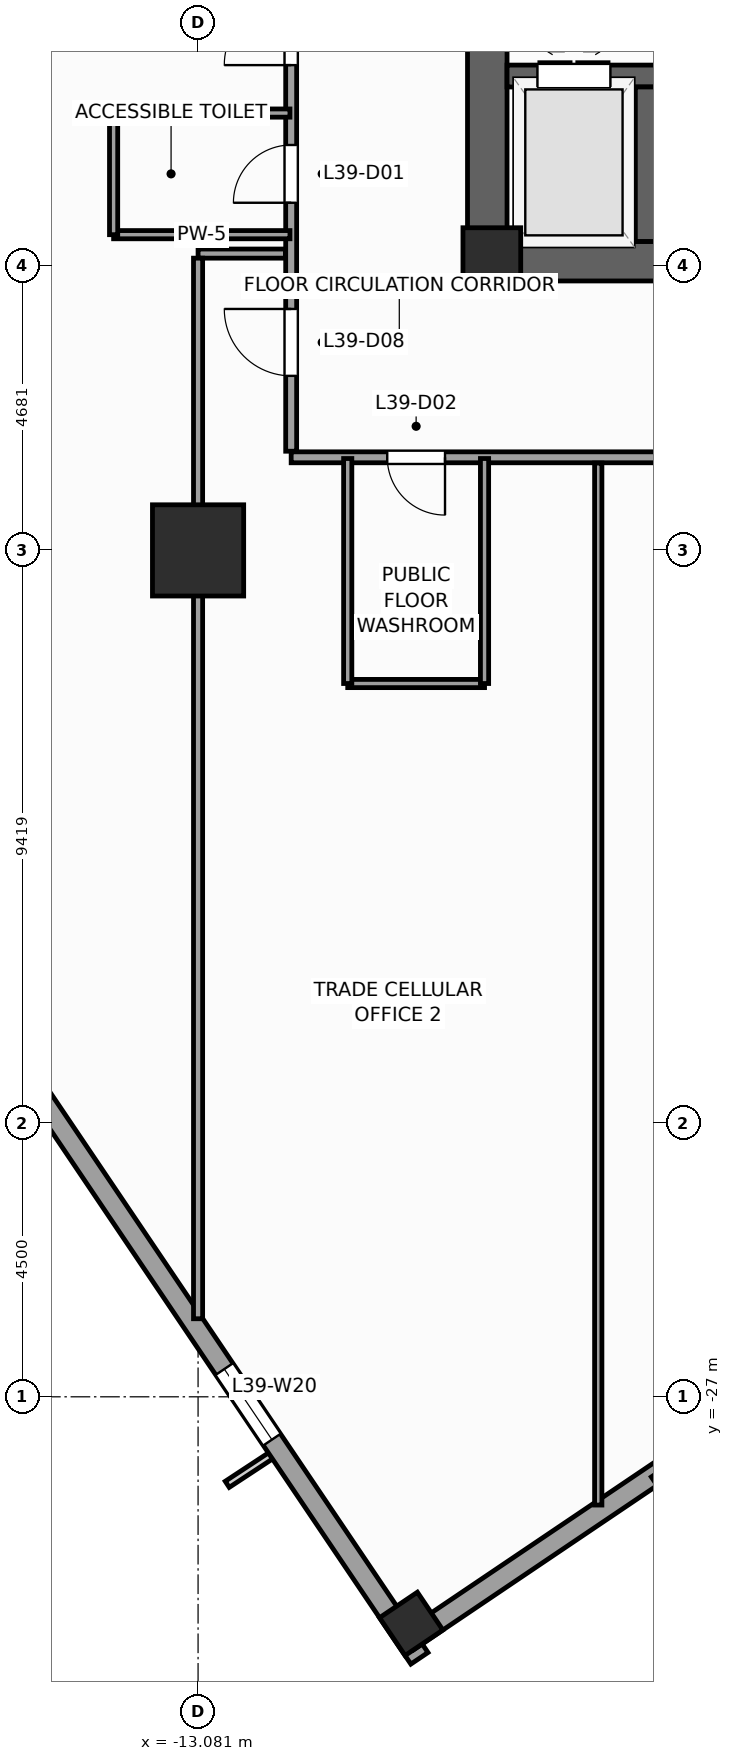
"""IFC4 building model, lengths in metres.
Left out: names, types, materials, properties, quantities, classifications, styles, units other than length and angle.
Written with IfcOpenShell. Run it as: python <this file> out.ifc"""

import sys

from ifc_helpers import new_model, si_unit, direction, frame, frame_2d, origin, origin_2d, place, context, subcontext, project, spatial, rectangle, extrude, source, transform, mapped, element, fill, save


model = new_model("IFC4")
c1 = context("Model", 3, precision=1e-05, world=origin(), true_north=direction((0.0, 1.0)))
c2 = subcontext(c1, "Body", "Model", "MODEL_VIEW")
j1 = project(units=[si_unit("LENGTHUNIT", "METRE"), si_unit("PLANEANGLEUNIT", "RADIAN")], contexts=[c1])
p1 = place(None, origin())
s1 = spatial("IfcSite", under=j1, at=p1, CompositionType="ELEMENT")
p2 = place(p1, origin())
s2 = spatial("IfcBuilding", under=s1, at=p2, CompositionType="ELEMENT")
p3 = place(p2, frame((0.0, 0.0, 164.4)))
s3 = spatial("IfcBuildingStorey", under=s2, at=p3, CompositionType="ELEMENT", Elevation=164.4)
p4 = place(p3, frame((-8.65, -8.325, 0.0), z_axis=(0.0, 0.0, 1.0), x_axis=(1.0, 0.0, 0.0)))
e1 = element("IfcWall", 1, at=p4, inside=s3, PredefinedType="SHEAR", context=c2, shape_type="SweptSolid", body=[
    extrude(rectangle(XDim=17.3, YDim=0.65, at=frame_2d((8.65, 0.0))), origin(), (0.0, 0.0, 1.0), 4.0),
])
p5 = place(p4, frame((8.0, 0.0, 0.0)))
e2 = element("IfcOpeningElement", 2, at=p5, cuts=e1, PredefinedType="OPENING", context=c2, shape_type="SweptSolid", body=[
    extrude(rectangle(XDim=1.3, YDim=2.2, at=frame_2d((0.65, 1.1))), frame((0.0, 0.335, 0.0), z_axis=(0.0, -1.0, 0.0), x_axis=(1.0, 0.0, 0.0)), (0.0, 0.0, 1.0), 0.67),
])
p6 = place(p3, frame((-8.325, -8.0, 0.0), z_axis=(0.0, 0.0, 1.0), x_axis=(0.0, 1.0, 0.0)))
e3 = element("IfcWall", 3, at=p6, inside=s3, PredefinedType="SHEAR", context=c2, shape_type="SweptSolid", body=[
    extrude(rectangle(XDim=16.0, YDim=0.65, at=frame_2d((8.0, 0.0))), origin(), (0.0, 0.0, 1.0), 4.0),
])
p7 = place(p6, frame((4.69, 0.0, 0.0)))
e4 = element("IfcOpeningElement", 4, at=p7, cuts=e3, PredefinedType="OPENING", context=c2, shape_type="SweptSolid", body=[
    extrude(rectangle(XDim=1.3, YDim=2.2, at=frame_2d((0.65, 1.1))), frame((0.0, 0.335, 0.0), z_axis=(0.0, -1.0, 0.0), x_axis=(1.0, 0.0, 0.0)), (0.0, 0.0, 1.0), 0.67),
])
p8 = place(p3, frame((-8.0, -5.28, 0.0), z_axis=(0.0, 0.0, 1.0), x_axis=(1.0, 0.0, 0.0)))
e5 = element("IfcWall", 5, at=p8, inside=s3, PredefinedType="SHEAR", context=c2, shape_type="SweptSolid", body=[
    extrude(rectangle(XDim=3.46, YDim=0.36, at=frame_2d((1.73, 0.0))), origin(), (0.0, 0.0, 1.0), 4.0),
])
p9 = place(p8, frame((0.5, 0.0, 0.0)))
e6 = element("IfcOpeningElement", 6, at=p9, cuts=e5, PredefinedType="OPENING", context=c2, shape_type="SweptSolid", body=[
    extrude(rectangle(XDim=1.2, YDim=2.25, at=frame_2d((0.6, 1.125))), frame((0.0, 0.19, 0.0), z_axis=(0.0, -1.0, 0.0), x_axis=(1.0, 0.0, 0.0)), (0.0, 0.0, 1.0), 0.38),
])
p10 = place(p3, frame((-5.71, -8.0, 0.0), z_axis=(0.0, 0.0, 1.0), x_axis=(0.0, 1.0, 0.0)))
e7 = element("IfcWall", 7, at=p10, inside=s3, PredefinedType="SHEAR", context=c2, shape_type="SweptSolid", body=[
    extrude(rectangle(XDim=2.54, YDim=0.36, at=frame_2d((1.27, 0.0))), origin(), (0.0, 0.0, 1.0), 4.0),
])
m1 = source(origin(), c2, "Body", "SweptSolid", [
    extrude(rectangle(XDim=0.95, YDim=0.95, at=origin_2d()), origin(), (0.0, 0.0, 1.0), 4.0),
])
p11 = place(p3, frame((-8.25, -8.25, 0.0), z_axis=(0.0, 0.0, 1.0), x_axis=(1.0, 0.0, 0.0)))
e8 = element("IfcColumn", 8, at=p11, inside=s3, PredefinedType="PILASTER", context=c2, shape_type="MappedRepresentation", body=[
    mapped(m1, transform((0.0, 0.0, 0.0), scale=1.0)),
])
m2 = source(origin(), c2, "Body", "SweptSolid", [
    extrude(rectangle(XDim=1.5, YDim=1.5, at=origin_2d()), origin(), (0.0, 0.0, 1.0), 4.0),
])
p12 = place(p3, frame((-13.081, -13.081, 0.0), z_axis=(0.0, 0.0, 1.0), x_axis=(1.0, 0.0, 0.0)))
e9 = element("IfcColumn", 9, at=p12, inside=s3, PredefinedType="COLUMN", context=c2, shape_type="MappedRepresentation", body=[
    mapped(m2, transform((0.0, 0.0, 0.0), scale=1.0)),
])
m3 = source(origin(), c2, "Body", "SweptSolid", [
    extrude(rectangle(XDim=0.75, YDim=0.75, at=origin_2d()), origin(), (0.0, 0.0, 1.0), 4.0),
])
p13 = place(p3, frame((-9.576, -30.734, 0.0), z_axis=(0.0, 0.0, 1.0), x_axis=(0.829037572555, 0.559192903471, 0.0)))
e10 = element("IfcColumn", 10, at=p13, inside=s3, PredefinedType="COLUMN", context=c2, shape_type="MappedRepresentation", body=[
    mapped(m3, transform((0.0, 0.0, 0.0), scale=1.0)),
])
p14 = place(p3, frame((-32.558, 2.972, 0.0), z_axis=(0.0, 0.0, 1.0), x_axis=(0.559194910251, -0.829036218961, 0.0)))
e11 = element("IfcWall", 11, at=p14, inside=s3, PredefinedType="STANDARD", context=c2, shape_type="SweptSolid", body=[
    extrude(rectangle(XDim=41.34, YDim=0.34, at=frame_2d((20.67, 0.0))), origin(), (0.0, 0.0, 1.0), 3.04),
])
p15 = place(p14, frame((5.761, 0.0, 0.56)))
e12 = element("IfcOpeningElement", 12, at=p15, cuts=e11, PredefinedType="OPENING", context=c2, shape_type="SweptSolid", body=[
    extrude(rectangle(XDim=1.4, YDim=2.4, at=frame_2d((0.7, 1.2))), frame((0.0, 0.18, 0.0), z_axis=(0.0, -1.0, 0.0), x_axis=(1.0, 0.0, 0.0)), (0.0, 0.0, 1.0), 0.36),
])
p16 = place(p14, frame((11.064, 0.0, 0.61)))
e13 = element("IfcOpeningElement", 13, at=p16, cuts=e11, PredefinedType="OPENING", context=c2, shape_type="SweptSolid", body=[
    extrude(rectangle(XDim=1.85, YDim=2.35, at=frame_2d((0.925, 1.175))), frame((0.0, 0.18, 0.0), z_axis=(0.0, -1.0, 0.0), x_axis=(1.0, 0.0, 0.0)), (0.0, 0.0, 1.0), 0.36),
])
p17 = place(p14, frame((18.168, 0.0, 0.61)))
e14 = element("IfcOpeningElement", 14, at=p17, cuts=e11, PredefinedType="OPENING", context=c2, shape_type="SweptSolid", body=[
    extrude(rectangle(XDim=1.85, YDim=2.35, at=frame_2d((0.925, 1.175))), frame((0.0, 0.18, 0.0), z_axis=(0.0, -1.0, 0.0), x_axis=(1.0, 0.0, 0.0)), (0.0, 0.0, 1.0), 0.36),
])
p18 = place(p14, frame((27.186, 0.0, 0.61)))
e15 = element("IfcOpeningElement", 15, at=p18, cuts=e11, PredefinedType="OPENING", context=c2, shape_type="SweptSolid", body=[
    extrude(rectangle(XDim=1.85, YDim=2.35, at=frame_2d((0.925, 1.175))), frame((0.0, 0.18, 0.0), z_axis=(0.0, -1.0, 0.0), x_axis=(1.0, 0.0, 0.0)), (0.0, 0.0, 1.0), 0.36),
])
p19 = place(p14, frame((35.602, 0.0, 0.56)))
e16 = element("IfcOpeningElement", 16, at=p19, cuts=e11, PredefinedType="OPENING", context=c2, shape_type="SweptSolid", body=[
    extrude(rectangle(XDim=1.4, YDim=2.4, at=frame_2d((0.7, 1.2))), frame((0.0, 0.18, 0.0), z_axis=(0.0, -1.0, 0.0), x_axis=(1.0, 0.0, 0.0)), (0.0, 0.0, 1.0), 0.36),
])
p20 = place(p3, frame((-9.631, -31.019, 0.0), z_axis=(0.0, 0.0, 1.0), x_axis=(0.829025804298, 0.559210350234, 0.0)))
e17 = element("IfcWall", 17, at=p20, inside=s3, PredefinedType="STANDARD", context=c2, shape_type="SweptSolid", body=[
    extrude(rectangle(XDim=5.0, YDim=0.34, at=frame_2d((2.5, 0.0))), origin(), (0.0, 0.0, 1.0), 3.74),
])
p21 = place(p3, frame((-5.486, -28.223, 0.0), z_axis=(0.0, 0.0, 1.0), x_axis=(0.559171107879, -0.82905227345, 0.0)))
e18 = element("IfcWall", 18, at=p21, inside=s3, PredefinedType="STANDARD", context=c2, shape_type="SweptSolid", body=[
    extrude(rectangle(XDim=5.17, YDim=0.34, at=frame_2d((2.585, 0.0))), origin(), (0.0, 0.0, 1.0), 3.04),
])
p22 = place(p21, frame((1.885, 0.0, 0.56)))
e19 = element("IfcOpeningElement", 19, at=p22, cuts=e18, PredefinedType="OPENING", context=c2, shape_type="SweptSolid", body=[
    extrude(rectangle(XDim=1.4, YDim=2.4, at=frame_2d((0.7, 1.2))), frame((0.0, 0.18, 0.0), z_axis=(0.0, -1.0, 0.0), x_axis=(1.0, 0.0, 0.0)), (0.0, 0.0, 1.0), 0.36),
])
p23 = place(p3, frame((-11.55, -11.55, 0.0), z_axis=(0.0, 0.0, 1.0), x_axis=(1.0, 0.0, 0.0)))
e20 = element("IfcWall", 20, at=p23, inside=s3, PredefinedType="PARTITIONING", context=c2, shape_type="SweptSolid", body=[
    extrude(rectangle(XDim=22.0, YDim=0.18, at=frame_2d((11.0, 0.0))), origin(), (0.0, 0.0, 1.0), 3.74),
])
p24 = place(p23, frame((1.58, 0.0, 0.0)))
e21 = element("IfcOpeningElement", 21, at=p24, cuts=e20, PredefinedType="OPENING", context=c2, shape_type="SweptSolid", body=[
    extrude(rectangle(XDim=0.95, YDim=2.1, at=frame_2d((0.475, 1.05))), frame((0.0, 0.1, 0.0), z_axis=(0.0, -1.0, 0.0), x_axis=(1.0, 0.0, 0.0)), (0.0, 0.0, 1.0), 0.2),
])
p25 = place(p23, frame((6.75, 0.0, 0.0)))
e22 = element("IfcOpeningElement", 22, at=p25, cuts=e20, PredefinedType="OPENING", context=c2, shape_type="SweptSolid", body=[
    extrude(rectangle(XDim=1.1, YDim=2.2, at=frame_2d((0.55, 1.1))), frame((0.0, 0.1, 0.0), z_axis=(0.0, -1.0, 0.0), x_axis=(1.0, 0.0, 0.0)), (0.0, 0.0, 1.0), 0.2),
])
p26 = place(p23, frame((11.25, 0.0, 0.0)))
e23 = element("IfcOpeningElement", 23, at=p26, cuts=e20, PredefinedType="OPENING", context=c2, shape_type="SweptSolid", body=[
    extrude(rectangle(XDim=1.1, YDim=2.2, at=frame_2d((0.55, 1.1))), frame((0.0, 0.1, 0.0), z_axis=(0.0, -1.0, 0.0), x_axis=(1.0, 0.0, 0.0)), (0.0, 0.0, 1.0), 0.2),
])
p27 = place(p23, frame((15.75, 0.0, 0.0)))
e24 = element("IfcOpeningElement", 24, at=p27, cuts=e20, PredefinedType="OPENING", context=c2, shape_type="SweptSolid", body=[
    extrude(rectangle(XDim=1.1, YDim=2.2, at=frame_2d((0.55, 1.1))), frame((0.0, 0.1, 0.0), z_axis=(0.0, -1.0, 0.0), x_axis=(1.0, 0.0, 0.0)), (0.0, 0.0, 1.0), 0.2),
])
p28 = place(p23, frame((19.561, 0.0, 0.0)))
e25 = element("IfcOpeningElement", 25, at=p28, cuts=e20, PredefinedType="OPENING", context=c2, shape_type="SweptSolid", body=[
    extrude(rectangle(XDim=1.1, YDim=2.2, at=frame_2d((0.55, 1.1))), frame((0.0, 0.1, 0.0), z_axis=(0.0, -1.0, 0.0), x_axis=(1.0, 0.0, 0.0)), (0.0, 0.0, 1.0), 0.2),
])
p29 = place(p3, frame((-11.55, -11.45, 0.0), z_axis=(0.0, 0.0, 1.0), x_axis=(0.0, 1.0, 0.0)))
e26 = element("IfcWall", 26, at=p29, inside=s3, PredefinedType="PARTITIONING", context=c2, shape_type="SweptSolid", body=[
    extrude(rectangle(XDim=13.05, YDim=0.18, at=frame_2d((6.525, 0.0))), origin(), (0.0, 0.0, 1.0), 3.74),
])
p30 = place(p29, frame((4.086, 0.0, 0.0)))
e27 = element("IfcOpeningElement", 27, at=p30, cuts=e26, PredefinedType="OPENING", context=c2, shape_type="SweptSolid", body=[
    extrude(rectangle(XDim=0.95, YDim=2.1, at=frame_2d((0.475, 1.05))), frame((0.0, 0.1, 0.0), z_axis=(0.0, -1.0, 0.0), x_axis=(1.0, 0.0, 0.0)), (0.0, 0.0, 1.0), 0.2),
])
p31 = place(p29, frame((11.01, 0.0, 0.0)))
e28 = element("IfcOpeningElement", 28, at=p31, cuts=e26, PredefinedType="OPENING", context=c2, shape_type="SweptSolid", body=[
    extrude(rectangle(XDim=1.1, YDim=2.2, at=frame_2d((0.55, 1.1))), frame((0.0, 0.1, 0.0), z_axis=(0.0, -1.0, 0.0), x_axis=(1.0, 0.0, 0.0)), (0.0, 0.0, 1.0), 0.2),
])
p32 = place(p29, frame((8.775, 0.0, 0.0)))
e29 = element("IfcOpeningElement", 29, at=p32, cuts=e26, PredefinedType="OPENING", context=c2, shape_type="SweptSolid", body=[
    extrude(rectangle(XDim=1.1, YDim=2.2, at=frame_2d((0.55, 1.1))), frame((0.0, 0.1, 0.0), z_axis=(0.0, -1.0, 0.0), x_axis=(1.0, 0.0, 0.0)), (0.0, 0.0, 1.0), 0.2),
])
p33 = place(p29, frame((6.35, 0.0, 0.0)))
e30 = element("IfcOpeningElement", 30, at=p33, cuts=e26, PredefinedType="OPENING", context=c2, shape_type="SweptSolid", body=[
    extrude(rectangle(XDim=1.1, YDim=2.2, at=frame_2d((0.55, 1.1))), frame((0.0, 0.1, 0.0), z_axis=(0.0, -1.0, 0.0), x_axis=(1.0, 0.0, 0.0)), (0.0, 0.0, 1.0), 0.2),
])
p34 = place(p29, frame((1.24, 0.0, 0.0)))
e31 = element("IfcOpeningElement", 31, at=p34, cuts=e26, PredefinedType="OPENING", context=c2, shape_type="SweptSolid", body=[
    extrude(rectangle(XDim=1.1, YDim=2.2, at=frame_2d((0.55, 1.1))), frame((0.0, 0.1, 0.0), z_axis=(0.0, -1.0, 0.0), x_axis=(1.0, 0.0, 0.0)), (0.0, 0.0, 1.0), 0.2),
])
p35 = place(p3, frame((-11.645, -8.2, 0.0), z_axis=(0.0, 0.0, 1.0), x_axis=(-1.0, 0.0, 0.0)))
e32 = element("IfcWall", 32, at=p35, inside=s3, PredefinedType="PARTITIONING", context=c2, shape_type="SweptSolid", body=[
    extrude(rectangle(XDim=1.436, YDim=0.15, at=frame_2d((0.718, 0.0))), origin(), (0.0, 0.0, 1.0), 3.74),
])
p36 = place(p3, frame((-13.081, -8.275, 0.0), z_axis=(0.0, 0.0, 1.0), x_axis=(0.0, -1.0, 0.0)))
e33 = element("IfcWall", 33, at=p36, inside=s3, PredefinedType="PARTITIONING", context=c2, shape_type="SweptSolid", body=[
    extrude(rectangle(XDim=17.441, YDim=0.15, at=frame_2d((8.721, 0.0))), origin(), (0.0, 0.0, 1.0), 2.84),
])
p37 = place(p3, frame((-6.5, -28.78, 0.0), z_axis=(0.0, 0.0, 1.0), x_axis=(0.0, 1.0, 0.0)))
e34 = element("IfcWall", 34, at=p37, inside=s3, PredefinedType="PARTITIONING", context=c2, shape_type="SweptSolid", body=[
    extrude(rectangle(XDim=17.135, YDim=0.12, at=frame_2d((8.567, 0.0))), origin(), (0.0, 0.0, 1.0), 3.74),
])
for number, where, z_axis, x_axis in (
    (35, (-14.47, -7.889, 0.0), (0.0, 0.0, 1.0), (1.0, 0.0, 0.0)),
    (36, (-14.47, -5.889, 0.0), (0.0, 0.0, 1.0), (1.0, 0.0, 0.0)),
):
    element("IfcWall", number, at=place(p3, frame(where, z_axis=z_axis, x_axis=x_axis)), inside=s3, PredefinedType="PARTITIONING", context=c2, shape_type="SweptSolid", body=[
        extrude(rectangle(XDim=2.9, YDim=0.135, at=frame_2d((1.45, 0.0))), origin(), (0.0, 0.0, 1.0), 3.74),
    ])
p38 = place(p3, frame((-14.47, -7.889, 0.0), z_axis=(0.0, 0.0, 1.0), x_axis=(0.0, 1.0, 0.0)))
e37 = element("IfcWall", 37, at=p38, inside=s3, PredefinedType="PARTITIONING", context=c2, shape_type="SweptSolid", body=[
    extrude(rectangle(XDim=2.0, YDim=0.135, at=frame_2d((1.0, 0.0))), origin(), (0.0, 0.0, 1.0), 3.74),
])
p39 = place(p3, frame((-10.62, -15.27, 0.0), z_axis=(0.0, 0.0, 1.0), x_axis=(1.0, 0.0, 0.0)))
e38 = element("IfcWall", 38, at=p39, inside=s3, PredefinedType="PARTITIONING", context=c2, shape_type="SweptSolid", body=[
    extrude(rectangle(XDim=2.25, YDim=0.135, at=frame_2d((1.125, 0.0))), origin(), (0.0, 0.0, 1.0), 3.74),
])
for number, where, z_axis, x_axis in (
    (39, (-8.37, -15.27, 0.0), (0.0, 0.0, 1.0), (0.0, 1.0, 0.0)),
    (40, (-10.62, -15.27, 0.0), (0.0, 0.0, 1.0), (0.0, 1.0, 0.0)),
):
    element("IfcWall", number, at=place(p3, frame(where, z_axis=z_axis, x_axis=x_axis)), inside=s3, PredefinedType="PARTITIONING", context=c2, shape_type="SweptSolid", body=[
        extrude(rectangle(XDim=3.7, YDim=0.135, at=frame_2d((1.85, 0.0))), origin(), (0.0, 0.0, 1.0), 3.74),
    ])
m4 = source(origin(), c2, "Body", "SweptSolid", [
    extrude(rectangle(XDim=1.4, YDim=2.4, at=frame_2d((0.7, 1.2))), frame((0.0, 0.03, 0.0), z_axis=(0.0, -1.0, 0.0), x_axis=(1.0, 0.0, 0.0)), (0.0, 0.0, 1.0), 0.06),
])
p40 = place(p19, origin())
e41 = element("IfcWindow", 41, at=p40, inside=s3, PartitioningType="SINGLE_PANEL", PredefinedType="WINDOW", context=c2, shape_type="MappedRepresentation", body=[
    mapped(m4, transform((0.0, 0.0, 0.0), scale=1.0)),
])
fill(e16, e41)
m5 = source(origin(), c2, "Body", "SweptSolid", [
    extrude(rectangle(XDim=1.2, YDim=2.25, at=frame_2d((0.6, 1.125))), frame((0.0, 0.025, 0.0), z_axis=(0.0, -1.0, 0.0), x_axis=(1.0, 0.0, 0.0)), (0.0, 0.0, 1.0), 0.05),
])
p41 = place(p9, origin())
e42 = element("IfcDoor", 42, at=p41, inside=s3, OperationType="DOUBLE_DOOR_SLIDING", PredefinedType="DOOR", context=c2, shape_type="MappedRepresentation", body=[
    mapped(m5, transform((0.0, 0.0, 0.0), scale=1.0)),
])
fill(e6, e42)
m6 = source(origin(), c2, "Body", "SweptSolid", [
    extrude(rectangle(XDim=0.95, YDim=2.1, at=frame_2d((0.475, 1.05))), frame((0.0, 0.025, 0.0), z_axis=(0.0, -1.0, 0.0), x_axis=(1.0, 0.0, 0.0)), (0.0, 0.0, 1.0), 0.05),
])
p42 = place(p30, origin())
e43 = element("IfcDoor", 43, at=p42, inside=s3, OperationType="SINGLE_SWING_LEFT", PredefinedType="DOOR", context=c2, shape_type="MappedRepresentation", body=[
    mapped(m6, transform((0.0, 0.0, 0.0), scale=1.0)),
])
fill(e27, e43)
p43 = place(p24, frame((0.95, 0.0, 0.0), z_axis=(0.0, 0.0, 1.0), x_axis=(-1.0, 0.0, 0.0)))
e44 = element("IfcDoor", 44, at=p43, inside=s3, OperationType="SINGLE_SWING_RIGHT", PredefinedType="DOOR", context=c2, shape_type="MappedRepresentation", body=[
    mapped(m6, transform((0.0, 0.0, 0.0), scale=1.0)),
])
fill(e21, e44)
m7 = source(origin(), c2, "Body", "SweptSolid", [
    extrude(rectangle(XDim=1.1, YDim=2.2, at=frame_2d((0.55, 1.1))), frame((0.0, 0.025, 0.0), z_axis=(0.0, -1.0, 0.0), x_axis=(1.0, 0.0, 0.0)), (0.0, 0.0, 1.0), 0.05),
])
p44 = place(p33, origin())
e45 = element("IfcDoor", 45, at=p44, inside=s3, OperationType="SINGLE_SWING_LEFT", PredefinedType="DOOR", context=c2, shape_type="MappedRepresentation", body=[
    mapped(m7, transform((0.0, 0.0, 0.0), scale=1.0)),
])
fill(e30, e45)
p45 = place(p34, origin())
e46 = element("IfcDoor", 46, at=p45, inside=s3, OperationType="SINGLE_SWING_RIGHT", PredefinedType="DOOR", context=c2, shape_type="MappedRepresentation", body=[
    mapped(m7, transform((0.0, 0.0, 0.0), scale=1.0)),
])
fill(e31, e46)
save(model, sys.argv[1])
